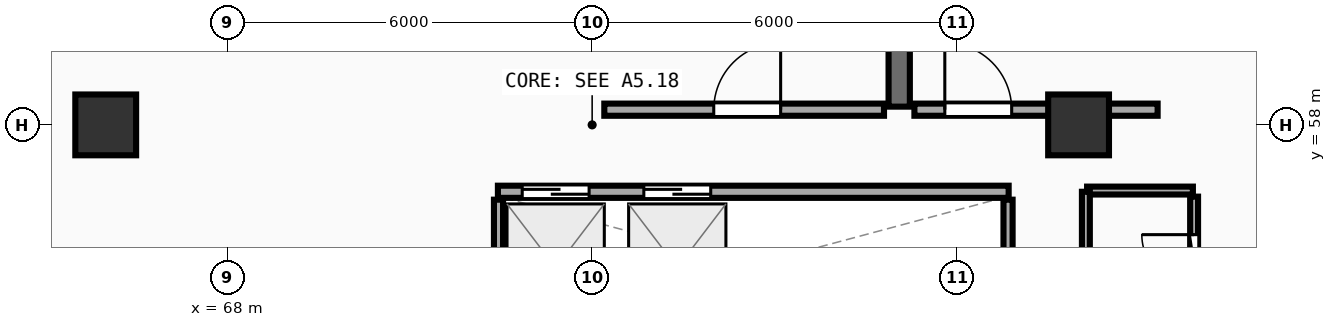
"""IFC4 building model, lengths in metres.
Left out: names, types, materials, properties, quantities, classifications, styles, units other than length and angle.
Written with IfcOpenShell. Run it as: python <this file> out.ifc"""

import sys

from ifc_helpers import new_model, si_unit, direction, frame, frame_2d, origin, origin_2d, place, context, subcontext, project, spatial, rectangle, extrude, element, fill, save


model = new_model("IFC4")
c1 = context("Model", 3, precision=1e-05, world=origin(), true_north=direction((0.0, 1.0)))
c2 = subcontext(c1, "Body", "Model", "MODEL_VIEW")
j1 = project(units=[si_unit("LENGTHUNIT", "METRE"), si_unit("PLANEANGLEUNIT", "RADIAN")], contexts=[c1])
p1 = place(None, origin())
s1 = spatial("IfcSite", under=j1, at=p1, CompositionType="ELEMENT")
p2 = place(p1, origin())
s2 = spatial("IfcBuilding", under=s1, at=p2, CompositionType="ELEMENT")
p3 = place(p2, frame((0.0, 0.0, 242.96)))
s3 = spatial("IfcBuildingStorey", under=s2, at=p3, CompositionType="ELEMENT", Elevation=242.96)
for number, where, z_axis, x_axis in (
    (1, (82.0, 58.0, 0.0), (0.0, 0.0, 1.0), (1.0, 0.0, 0.0)),
    (2, (66.0, 58.0, 0.0), (0.0, 0.0, 1.0), (1.0, 0.0, 0.0)),
):
    element("IfcColumn", number, at=place(p3, frame(where, z_axis=z_axis, x_axis=x_axis)), inside=s3, PredefinedType="PILASTER", context=c2, shape_type="SweptSolid", body=[
        extrude(rectangle(XDim=1.0, YDim=1.0, at=origin_2d()), origin(), (0.0, 0.0, 1.0), 5.74),
    ])
p4 = place(p3, frame((79.05, 58.3, 0.0), z_axis=(0.0, 0.0, 1.0), x_axis=(0.0, 1.0, 0.0)))
e3 = element("IfcWall", 3, at=p4, inside=s3, PredefinedType="SHEAR", context=c2, shape_type="SweptSolid", body=[
    extrude(rectangle(XDim=6.3, YDim=0.35, at=frame_2d((3.15, 0.0))), origin(), (0.0, 0.0, 1.0), 5.48),
])
p5 = place(p3, frame((74.2, 58.25, 0.0), z_axis=(0.0, 0.0, 1.0), x_axis=(1.0, 0.0, 0.0)))
e4 = element("IfcWall", 4, at=p5, inside=s3, PredefinedType="SOLIDWALL", context=c2, shape_type="SweptSolid", body=[
    extrude(rectangle(XDim=4.6, YDim=0.2, at=frame_2d((2.3, 0.0))), origin(), (0.0, 0.0, 1.0), 5.47),
])
p6 = place(p5, frame((1.8, 0.0, 0.0)))
e5 = element("IfcOpeningElement", 5, at=p6, cuts=e4, PredefinedType="OPENING", context=c2, shape_type="SweptSolid", body=[
    extrude(rectangle(XDim=1.1, YDim=2.1, at=frame_2d((0.55, 1.05))), frame((0.0, 0.11, 0.0), z_axis=(0.0, -1.0, 0.0), x_axis=(1.0, 0.0, 0.0)), (0.0, 0.0, 1.0), 0.22),
])
p7 = place(p3, frame((79.3, 58.25, 0.0), z_axis=(0.0, 0.0, 1.0), x_axis=(1.0, 0.0, 0.0)))
e6 = element("IfcWall", 6, at=p7, inside=s3, PredefinedType="SOLIDWALL", context=c2, shape_type="SweptSolid", body=[
    extrude(rectangle(XDim=4.0, YDim=0.2, at=frame_2d((2.0, 0.0))), origin(), (0.0, 0.0, 1.0), 4.765),
])
p8 = place(p7, frame((0.5, 0.0, 0.0)))
e7 = element("IfcOpeningElement", 7, at=p8, cuts=e6, PredefinedType="OPENING", context=c2, shape_type="SweptSolid", body=[
    extrude(rectangle(XDim=1.1, YDim=2.1, at=frame_2d((0.55, 1.05))), frame((0.0, 0.11, 0.0), z_axis=(0.0, -1.0, 0.0), x_axis=(1.0, 0.0, 0.0)), (0.0, 0.0, 1.0), 0.22),
])
p9 = place(p3, frame((72.45, 56.9, 0.0), z_axis=(0.0, 0.0, 1.0), x_axis=(1.0, 0.0, 0.0)))
e8 = element("IfcWall", 8, at=p9, inside=s3, PredefinedType="SOLIDWALL", context=c2, shape_type="SweptSolid", body=[
    extrude(rectangle(XDim=8.4, YDim=0.2, at=frame_2d((4.2, 0.0))), origin(), (0.0, 0.0, 1.0), 5.47),
])
p10 = place(p9, frame((0.4, 0.0, 0.0)))
e9 = element("IfcOpeningElement", 9, at=p10, cuts=e8, PredefinedType="OPENING", context=c2, shape_type="SweptSolid", body=[
    extrude(rectangle(XDim=1.1, YDim=2.1, at=frame_2d((0.55, 1.05))), frame((0.0, 0.11, 0.0), z_axis=(0.0, -1.0, 0.0), x_axis=(1.0, 0.0, 0.0)), (0.0, 0.0, 1.0), 0.22),
])
p11 = place(p9, frame((2.4, 0.0, 0.0)))
e10 = element("IfcOpeningElement", 10, at=p11, cuts=e8, PredefinedType="OPENING", context=c2, shape_type="SweptSolid", body=[
    extrude(rectangle(XDim=1.1, YDim=2.1, at=frame_2d((0.55, 1.05))), frame((0.0, 0.11, 0.0), z_axis=(0.0, -1.0, 0.0), x_axis=(1.0, 0.0, 0.0)), (0.0, 0.0, 1.0), 0.22),
])
for number, where, z_axis, x_axis in (
    (11, (72.46, 54.48, 0.0), (0.0, 0.0, 1.0), (0.0, 1.0, 0.0)),
    (12, (80.84, 54.48, 0.0), (0.0, 0.0, 1.0), (0.0, 1.0, 0.0)),
):
    element("IfcWall", number, at=place(p3, frame(where, z_axis=z_axis, x_axis=x_axis)), inside=s3, PredefinedType="PARTITIONING", context=c2, shape_type="SweptSolid", body=[
        extrude(rectangle(XDim=2.29, YDim=0.15, at=frame_2d((1.145, 0.0))), origin(), (0.0, 0.0, 1.0), 5.47),
    ])
p12 = place(p3, frame((83.9, 54.71, 0.0), z_axis=(0.0, 0.0, 1.0), x_axis=(0.0, 1.0, 0.0)))
e13 = element("IfcWall", 13, at=p12, inside=s3, PredefinedType="PLUMBINGWALL", context=c2, shape_type="SweptSolid", body=[
    extrude(rectangle(XDim=2.11, YDim=0.13, at=frame_2d((1.055, 0.0))), origin(), (0.0, 0.0, 1.0), 5.47),
])
p13 = place(p12, frame((0.625, 0.0, 0.0)))
e14 = element("IfcOpeningElement", 14, at=p13, cuts=e13, PredefinedType="OPENING", context=c2, shape_type="SweptSolid", body=[
    extrude(rectangle(XDim=0.86, YDim=2.05, at=frame_2d((0.43, 1.025))), frame((0.0, 0.075, 0.0), z_axis=(0.0, -1.0, 0.0), x_axis=(1.0, 0.0, 0.0)), (0.0, 0.0, 1.0), 0.15),
])
p14 = place(p3, frame((83.88, 56.92, 0.0), z_axis=(0.0, 0.0, 1.0), x_axis=(-1.0, 0.0, 0.0)))
e15 = element("IfcWall", 15, at=p14, inside=s3, PredefinedType="PLUMBINGWALL", context=c2, shape_type="SweptSolid", body=[
    extrude(rectangle(XDim=1.74, YDim=0.13, at=frame_2d((0.87, 0.0))), origin(), (0.0, 0.0, 1.0), 4.765),
])
p15 = place(p3, frame((82.12, 56.9, 0.0), z_axis=(0.0, 0.0, 1.0), x_axis=(0.0, -1.0, 0.0)))
e16 = element("IfcWall", 16, at=p15, inside=s3, PredefinedType="PLUMBINGWALL", context=c2, shape_type="SweptSolid", body=[
    extrude(rectangle(XDim=2.26, YDim=0.13, at=frame_2d((1.13, 0.0))), origin(), (0.0, 0.0, 1.0), 4.765),
])
p16 = place(p6, frame((1.1, 0.0, 0.0), z_axis=(0.0, 0.0, 1.0), x_axis=(-1.0, 0.0, 0.0)))
e17 = element("IfcDoor", 17, at=p16, inside=s3, OperationType="SINGLE_SWING_LEFT", PredefinedType="DOOR", context=c2, shape_type="SweptSolid", body=[
    extrude(rectangle(XDim=1.1, YDim=2.1, at=frame_2d((0.55, 1.05))), frame((0.0, 0.025, 0.0), z_axis=(0.0, -1.0, 0.0), x_axis=(1.0, 0.0, 0.0)), (0.0, 0.0, 1.0), 0.05),
])
fill(e5, e17)
p17 = place(p8, frame((1.1, 0.0, 0.0), z_axis=(0.0, 0.0, 1.0), x_axis=(-1.0, 0.0, 0.0)))
e18 = element("IfcDoor", 18, at=p17, inside=s3, OperationType="SINGLE_SWING_RIGHT", PredefinedType="DOOR", context=c2, shape_type="SweptSolid", body=[
    extrude(rectangle(XDim=1.1, YDim=2.1, at=frame_2d((0.55, 1.05))), frame((0.0, 0.025, 0.0), z_axis=(0.0, -1.0, 0.0), x_axis=(1.0, 0.0, 0.0)), (0.0, 0.0, 1.0), 0.05),
])
fill(e7, e18)
p18 = place(p10, origin())
e19 = element("IfcDoor", 19, at=p18, inside=s3, OperationType="DOUBLE_DOOR_SLIDING", PredefinedType="DOOR", context=c2, shape_type="SweptSolid", body=[
    extrude(rectangle(XDim=1.1, YDim=2.1, at=frame_2d((0.55, 1.05))), frame((0.0, 0.025, 0.0), z_axis=(0.0, -1.0, 0.0), x_axis=(1.0, 0.0, 0.0)), (0.0, 0.0, 1.0), 0.05),
])
fill(e9, e19)
p19 = place(p11, origin())
e20 = element("IfcDoor", 20, at=p19, inside=s3, OperationType="DOUBLE_DOOR_SLIDING", PredefinedType="DOOR", context=c2, shape_type="SweptSolid", body=[
    extrude(rectangle(XDim=1.1, YDim=2.1, at=frame_2d((0.55, 1.05))), frame((0.0, 0.025, 0.0), z_axis=(0.0, -1.0, 0.0), x_axis=(1.0, 0.0, 0.0)), (0.0, 0.0, 1.0), 0.05),
])
fill(e10, e20)
p20 = place(p13, origin())
e21 = element("IfcDoor", 21, at=p20, inside=s3, OperationType="SINGLE_SWING_RIGHT", PredefinedType="DOOR", context=c2, shape_type="SweptSolid", body=[
    extrude(rectangle(XDim=0.86, YDim=2.05, at=frame_2d((0.43, 1.025))), frame((0.0, 0.025, 0.0), z_axis=(0.0, -1.0, 0.0), x_axis=(1.0, 0.0, 0.0)), (0.0, 0.0, 1.0), 0.05),
])
fill(e14, e21)
save(model, sys.argv[1])
